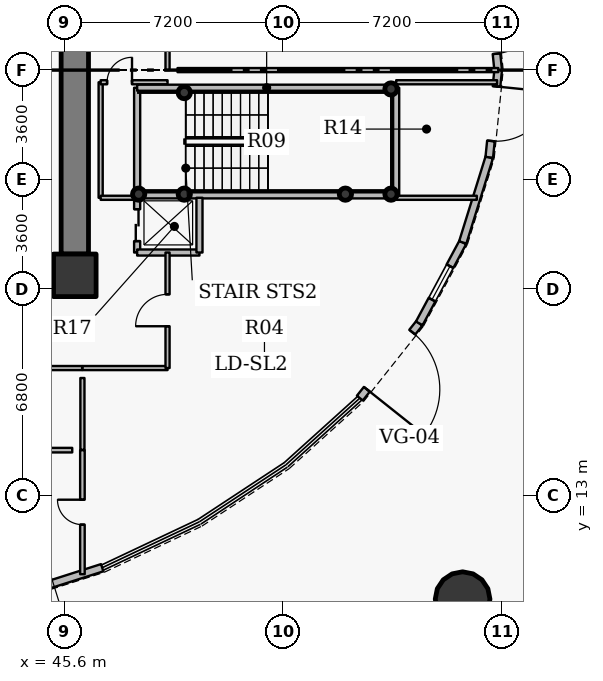
"""IFC4 building model, lengths in metres.
Left out: names, types, materials, properties, quantities, classifications, styles, units other than length and angle.
Written with IfcOpenShell. Run it as: python <this file> out.ifc"""

import sys

from ifc_helpers import new_model, si_unit, direction, frame, frame_2d, origin, origin_2d, place, context, subcontext, project, spatial, rectangle, hollow_circle, extrude, source, transform, mapped, element, fill, save


model = new_model("IFC4")
c1 = context("Model", 3, precision=1e-05, world=origin(), true_north=direction((0.0, 1.0)))
c2 = subcontext(c1, "Body", "Model", "MODEL_VIEW")
j1 = project(units=[si_unit("LENGTHUNIT", "METRE"), si_unit("PLANEANGLEUNIT", "RADIAN")], contexts=[c1])
p1 = place(None, origin())
s1 = spatial("IfcSite", under=j1, at=p1, CompositionType="ELEMENT")
p2 = place(p1, origin())
s2 = spatial("IfcBuilding", under=s1, at=p2, CompositionType="ELEMENT")
p3 = place(p2, origin())
s3 = spatial("IfcBuildingStorey", under=s2, at=p3, CompositionType="ELEMENT", Elevation=0.0)
p4 = place(p3, frame((45.95, 20.25, 0.0), z_axis=(0.0, 0.0, 1.0), x_axis=(1.0, 0.0, 0.0)))
e1 = element("IfcColumn", 1, at=p4, inside=s3, PredefinedType="COLUMN", context=c2, shape_type="SweptSolid", body=[
    extrude(rectangle(XDim=1.4, YDim=1.4, at=origin_2d()), origin(), (0.0, 0.0, 1.0), 6.0),
])
for number, where, z_axis, x_axis in (
    (2, (56.35, 26.38, 0.0), (0.0, 0.0, 1.0), (1.0, 0.0, 0.0)),
    (3, (56.35, 22.92, 0.0), (0.0, 0.0, 1.0), (1.0, 0.0, 0.0)),
    (4, (54.85, 22.92, 0.0), (0.0, 0.0, 1.0), (1.0, 0.0, 0.0)),
    (5, (49.55, 26.26, 0.0), (0.0, 0.0, 1.0), (1.0, 0.0, 0.0)),
    (6, (49.55, 22.92, 0.0), (0.0, 0.0, 1.0), (1.0, 0.0, 0.0)),
    (7, (48.05, 22.92, 0.0), (0.0, 0.0, 1.0), (1.0, 0.0, 0.0)),
):
    element("IfcColumn", number, at=place(p3, frame(where, z_axis=z_axis, x_axis=x_axis)), inside=s3, PredefinedType="COLUMN", context=c2, shape_type="SweptSolid", body=[
        extrude(hollow_circle(Radius=0.203, WallThickness=0.016, at=origin_2d()), origin(), (0.0, 0.0, 1.0), 6.0),
    ])
p5 = place(p3, frame((45.95, 33.05, 0.0), z_axis=(0.0, 0.0, 1.0), x_axis=(0.0, -1.0, 0.0)))
e8 = element("IfcWall", 8, at=p5, inside=s3, PredefinedType="SHEAR", context=c2, shape_type="SweptSolid", body=[
    extrude(rectangle(XDim=12.1, YDim=0.9, at=frame_2d((6.05, 0.0))), origin(), (0.0, 0.0, 1.0), 5.15),
])
p6 = place(p5, frame((2.328, 0.0, 0.0)))
e9 = element("IfcOpeningElement", 9, at=p6, cuts=e8, PredefinedType="OPENING", context=c2, shape_type="SweptSolid", body=[
    extrude(rectangle(XDim=1.15, YDim=2.15, at=origin_2d()), frame((0.575, 0.46, 1.075), z_axis=(0.0, -1.0, 0.0), x_axis=(1.0, 0.0, 0.0)), (0.0, 0.0, 1.0), 0.92),
])
p7 = place(p3, frame((45.25, 20.25, 0.0), z_axis=(0.0, 0.0, 1.0), x_axis=(-1.0, 0.0, 0.0)))
e10 = element("IfcWall", 10, at=p7, inside=s3, PredefinedType="SHEAR", context=c2, shape_type="SweptSolid", body=[
    extrude(rectangle(XDim=18.5, YDim=0.9, at=frame_2d((9.25, 0.0))), origin(), (0.0, 0.0, 1.0), 5.15),
])
p8 = place(p7, frame((10.0, 0.0, 0.0)))
e11 = element("IfcOpeningElement", 11, at=p8, cuts=e10, PredefinedType="OPENING", context=c2, shape_type="SweptSolid", body=[
    extrude(rectangle(XDim=1.15, YDim=2.15, at=origin_2d()), frame((0.575, 0.46, 1.075), z_axis=(0.0, -1.0, 0.0), x_axis=(1.0, 0.0, 0.0)), (0.0, 0.0, 1.0), 0.92),
])
p9 = place(p3, frame((58.705, 9.599, 0.0), z_axis=(0.0, 0.0, 1.0), x_axis=(1.0, 0.0, 0.0)))
e12 = element("IfcColumn", 12, at=p9, inside=s3, PredefinedType="COLUMN", context=c2, shape_type="SweptSolid", body=[
    extrude(hollow_circle(Radius=0.9, WallThickness=0.05, at=origin_2d()), origin(), (0.0, 0.0, 1.0), 6.0),
])
p10 = place(p3, frame((59.582, 29.869, 0.0), z_axis=(0.0, 0.0, 1.0), x_axis=(0.10159063445, -0.994826287847, 0.0)))
e13 = element("IfcWall", 13, at=p10, inside=s3, PredefinedType="SOLIDWALL", context=c2, shape_type="SweptSolid", body=[
    extrude(rectangle(XDim=2.884, YDim=0.25, at=frame_2d((1.442, 0.0))), origin(), (0.0, 0.0, 1.0), 4.885),
])
p11 = place(p10, frame((0.542, 0.0, 0.0)))
e14 = element("IfcOpeningElement", 14, at=p11, cuts=e13, PredefinedType="OPENING", context=c2, shape_type="SweptSolid", body=[
    extrude(rectangle(XDim=1.8, YDim=2.2, at=origin_2d()), frame((0.9, 0.135, 1.1), z_axis=(0.0, -1.0, 0.0), x_axis=(1.0, 0.0, 0.0)), (0.0, 0.0, 1.0), 0.27),
])
p12 = place(p3, frame((46.85, 10.633, 0.0), z_axis=(0.0, 0.0, 1.0), x_axis=(-0.952608721119, -0.304198330777, 0.0)))
e15 = element("IfcWall", 15, at=p12, inside=s3, PredefinedType="SOLIDWALL", context=c2, shape_type="SweptSolid", body=[
    extrude(rectangle(XDim=3.636, YDim=0.25, at=frame_2d((1.818, 0.0))), origin(), (0.0, 0.0, 1.0), 4.885),
])
p13 = place(p3, frame((57.28, 18.67, 0.0), z_axis=(0.0, 0.0, 1.0), x_axis=(-0.622274661909, -0.782798981314, 0.0)))
e16 = element("IfcWall", 16, at=p13, inside=s3, PredefinedType="SOLIDWALL", context=c2, shape_type="SweptSolid", body=[
    extrude(rectangle(XDim=3.141, YDim=0.25, at=frame_2d((1.57, 0.0))), origin(), (0.0, 0.0, 1.0), 4.885),
])
p14 = place(p13, frame((0.37, 0.0, 0.0)))
e17 = element("IfcOpeningElement", 17, at=p14, cuts=e16, PredefinedType="OPENING", context=c2, shape_type="SweptSolid", body=[
    extrude(rectangle(XDim=2.4, YDim=2.2, at=origin_2d()), frame((1.2, 0.135, 1.1), z_axis=(0.0, -1.0, 0.0), x_axis=(1.0, 0.0, 0.0)), (0.0, 0.0, 1.0), 0.27),
])
p15 = place(p3, frame((58.71, 21.332, 0.0), z_axis=(0.0, 0.0, 1.0), x_axis=(-0.473391396038, -0.880852193139, 0.0)))
e18 = element("IfcWall", 18, at=p15, inside=s3, PredefinedType="SOLIDWALL", context=c2, shape_type="SweptSolid", body=[
    extrude(rectangle(XDim=3.022, YDim=0.25, at=frame_2d((1.511, 0.0))), origin(), (0.0, 0.0, 1.0), 4.885),
])
p16 = place(p15, frame((0.886, 0.0, 0.9)))
e19 = element("IfcOpeningElement", 19, at=p16, cuts=e18, PredefinedType="OPENING", context=c2, shape_type="SweptSolid", body=[
    extrude(rectangle(XDim=1.25, YDim=1.65, at=origin_2d()), frame((0.625, 0.135, 0.825), z_axis=(0.0, -1.0, 0.0), x_axis=(1.0, 0.0, 0.0)), (0.0, 0.0, 1.0), 0.27),
])
p17 = place(p3, frame((59.582, 24.131, 0.0), z_axis=(0.0, 0.0, 1.0), x_axis=(-0.297355038878, -0.954766977254, 0.0)))
e20 = element("IfcWall", 20, at=p17, inside=s3, PredefinedType="SOLIDWALL", context=c2, shape_type="SweptSolid", body=[
    extrude(rectangle(XDim=2.932, YDim=0.25, at=frame_2d((1.466, 0.0))), origin(), (0.0, 0.0, 1.0), 5.7),
])
p18 = place(p3, frame((59.875, 27.0, 0.0), z_axis=(0.0, 0.0, 1.0), x_axis=(-0.10159063445, -0.994826287847, 0.0)))
e21 = element("IfcWall", 21, at=p18, inside=s3, PredefinedType="SOLIDWALL", context=c2, shape_type="SweptSolid", body=[
    extrude(rectangle(XDim=2.884, YDim=0.25, at=frame_2d((1.442, 0.0))), origin(), (0.0, 0.0, 1.0), 4.885),
])
p19 = place(p18, frame((0.542, 0.0, 0.0)))
e22 = element("IfcOpeningElement", 22, at=p19, cuts=e21, PredefinedType="OPENING", context=c2, shape_type="SweptSolid", body=[
    extrude(rectangle(XDim=1.8, YDim=2.2, at=origin_2d()), frame((0.9, 0.135, 1.1), z_axis=(0.0, -1.0, 0.0), x_axis=(1.0, 0.0, 0.0)), (0.0, 0.0, 1.0), 0.27),
])
p20 = place(p3, frame((46.2, 10.42, 0.0), z_axis=(0.0, 0.0, 1.0), x_axis=(0.0, 1.0, 0.0)))
e23 = element("IfcWall", 23, at=p20, inside=s3, PredefinedType="PARTITIONING", context=c2, shape_type="SweptSolid", body=[
    extrude(rectangle(XDim=4.08, YDim=0.15, at=frame_2d((2.04, 0.0))), origin(), (0.0, 0.0, 1.0), 5.7),
])
p21 = place(p20, frame((1.63, 0.0, 0.0)))
e24 = element("IfcOpeningElement", 24, at=p21, cuts=e23, PredefinedType="OPENING", context=c2, shape_type="SweptSolid", body=[
    extrude(rectangle(XDim=0.82, YDim=2.1, at=origin_2d()), frame((0.41, 0.085, 1.05), z_axis=(0.0, -1.0, 0.0), x_axis=(1.0, 0.0, 0.0)), (0.0, 0.0, 1.0), 0.17),
])
p22 = place(p3, frame((46.2, 17.2, 0.0), z_axis=(0.0, 0.0, 1.0), x_axis=(1.0, 0.0, 0.0)))
e25 = element("IfcWall", 25, at=p22, inside=s3, PredefinedType="PARTITIONING", context=c2, shape_type="SweptSolid", body=[
    extrude(rectangle(XDim=2.8, YDim=0.135, at=frame_2d((1.4, 0.0))), origin(), (0.0, 0.0, 1.0), 4.885),
])
p23 = place(p3, frame((46.8, 22.8, 0.0), z_axis=(0.0, 0.0, 1.0), x_axis=(0.0, 1.0, 0.0)))
e26 = element("IfcWall", 26, at=p23, inside=s3, PredefinedType="PARTITIONING", context=c2, shape_type="SweptSolid", body=[
    extrude(rectangle(XDim=3.8, YDim=0.135, at=frame_2d((1.9, 0.0))), origin(), (0.0, 0.0, 1.0), 4.885),
])
p24 = place(p3, frame((46.8, 22.8, 0.0), z_axis=(0.0, 0.0, 1.0), x_axis=(1.0, 0.0, 0.0)))
e27 = element("IfcWall", 27, at=p24, inside=s3, PredefinedType="PARTITIONING", context=c2, shape_type="SweptSolid", body=[
    extrude(rectangle(XDim=1.2, YDim=0.135, at=frame_2d((0.6, 0.0))), origin(), (0.0, 0.0, 1.0), 4.885),
])
p25 = place(p3, frame((46.8, 26.6, 0.0), z_axis=(0.0, 0.0, 1.0), x_axis=(1.0, 0.0, 0.0)))
e28 = element("IfcWall", 28, at=p25, inside=s3, PredefinedType="PARTITIONING", context=c2, shape_type="SweptSolid", body=[
    extrude(rectangle(XDim=2.2, YDim=0.135, at=frame_2d((1.1, 0.0))), origin(), (0.0, 0.0, 1.0), 5.7),
])
p26 = place(p25, frame((0.211, 0.0, 0.0)))
e29 = element("IfcOpeningElement", 29, at=p26, cuts=e28, PredefinedType="OPENING", context=c2, shape_type="SweptSolid", body=[
    extrude(rectangle(XDim=0.82, YDim=2.1, at=origin_2d()), frame((0.41, 0.078, 1.05), z_axis=(0.0, -1.0, 0.0), x_axis=(1.0, 0.0, 0.0)), (0.0, 0.0, 1.0), 0.155),
])
p27 = place(p3, frame((48.0, 21.0, 0.0), z_axis=(0.0, 0.0, 1.0), x_axis=(0.0, 1.0, 0.0)))
e30 = element("IfcWall", 30, at=p27, inside=s3, PredefinedType="PARTITIONING", context=c2, shape_type="SweptSolid", body=[
    extrude(rectangle(XDim=1.8, YDim=0.2, at=frame_2d((0.9, 0.0))), origin(), (0.0, 0.0, 1.0), 4.885),
])
p28 = place(p27, frame((0.375, 0.0, 0.0)))
e31 = element("IfcOpeningElement", 31, at=p28, cuts=e30, PredefinedType="OPENING", context=c2, shape_type="SweptSolid", body=[
    extrude(rectangle(XDim=1.05, YDim=2.15, at=origin_2d()), frame((0.525, 0.11, 1.075), z_axis=(0.0, -1.0, 0.0), x_axis=(1.0, 0.0, 0.0)), (0.0, 0.0, 1.0), 0.22),
])
p29 = place(p3, frame((48.0, 21.0, 0.0), z_axis=(0.0, 0.0, 1.0), x_axis=(1.0, 0.0, 0.0)))
e32 = element("IfcWall", 32, at=p29, inside=s3, PredefinedType="PARTITIONING", context=c2, shape_type="SweptSolid", body=[
    extrude(rectangle(XDim=2.05, YDim=0.2, at=frame_2d((1.025, 0.0))), origin(), (0.0, 0.0, 1.0), 5.7),
])
p30 = place(p3, frame((48.0, 22.88, 0.0), z_axis=(0.0, 0.0, 1.0), x_axis=(0.0, 1.0, 0.0)))
e33 = element("IfcWall", 33, at=p30, inside=s3, PredefinedType="PARTITIONING", context=c2, shape_type="SweptSolid", body=[
    extrude(rectangle(XDim=3.54, YDim=0.2, at=frame_2d((1.77, 0.0))), origin(), (0.0, 0.0, 1.0), 5.7),
])
p31 = place(p3, frame((48.01, 22.88, 0.0), z_axis=(0.0, 0.0, 1.0), x_axis=(1.0, 0.0, 0.0)))
e34 = element("IfcWall", 34, at=p31, inside=s3, PredefinedType="PARTITIONING", context=c2, shape_type="SweptSolid", body=[
    extrude(rectangle(XDim=8.51, YDim=0.2, at=frame_2d((4.255, 0.0))), origin(), (0.0, 0.0, 1.0), 5.7),
])
p32 = place(p3, frame((48.0, 26.42, 0.0), z_axis=(0.0, 0.0, 1.0), x_axis=(1.0, 0.0, 0.0)))
e35 = element("IfcWall", 35, at=p32, inside=s3, PredefinedType="PARTITIONING", context=c2, shape_type="SweptSolid", body=[
    extrude(rectangle(XDim=8.52, YDim=0.2, at=frame_2d((4.26, 0.0))), origin(), (0.0, 0.0, 1.0), 5.7),
])
p33 = place(p3, frame((49.0, 17.2, 0.0), z_axis=(0.0, 0.0, 1.0), x_axis=(0.0, 1.0, 0.0)))
e36 = element("IfcWall", 36, at=p33, inside=s3, PredefinedType="PARTITIONING", context=c2, shape_type="SweptSolid", body=[
    extrude(rectangle(XDim=3.8, YDim=0.135, at=frame_2d((1.9, 0.0))), origin(), (0.0, 0.0, 1.0), 4.885),
])
p34 = place(p33, frame((1.375, 0.0, 0.0)))
e37 = element("IfcOpeningElement", 37, at=p34, cuts=e36, PredefinedType="OPENING", context=c2, shape_type="SweptSolid", body=[
    extrude(rectangle(XDim=1.05, YDim=2.15, at=origin_2d()), frame((0.525, 0.078, 1.075), z_axis=(0.0, -1.0, 0.0), x_axis=(1.0, 0.0, 0.0)), (0.0, 0.0, 1.0), 0.155),
])
p35 = place(p3, frame((49.0, 27.0, 0.0), z_axis=(0.0, 0.0, 1.0), x_axis=(0.0, 1.0, 0.0)))
e38 = element("IfcWall", 38, at=p35, inside=s3, PredefinedType="PARTITIONING", context=c2, shape_type="SweptSolid", body=[
    extrude(rectangle(XDim=9.8, YDim=0.135, at=frame_2d((4.9, 0.0))), origin(), (0.0, 0.0, 1.0), 4.885),
])
p36 = place(p35, frame((4.375, 0.0, 0.0)))
e39 = element("IfcOpeningElement", 39, at=p36, cuts=e38, PredefinedType="OPENING", context=c2, shape_type="SweptSolid", body=[
    extrude(rectangle(XDim=1.05, YDim=2.15, at=origin_2d()), frame((0.525, 0.078, 1.075), z_axis=(0.0, -1.0, 0.0), x_axis=(1.0, 0.0, 0.0)), (0.0, 0.0, 1.0), 0.155),
])
p37 = place(p3, frame((50.05, 21.0, 0.0), z_axis=(0.0, 0.0, 1.0), x_axis=(0.0, 1.0, 0.0)))
e40 = element("IfcWall", 40, at=p37, inside=s3, PredefinedType="PARTITIONING", context=c2, shape_type="SweptSolid", body=[
    extrude(rectangle(XDim=1.8, YDim=0.2, at=frame_2d((0.9, 0.0))), origin(), (0.0, 0.0, 1.0), 4.885),
])
p38 = place(p3, frame((56.53, 22.8, 0.0), z_axis=(0.0, 0.0, 1.0), x_axis=(1.0, 0.0, 0.0)))
e41 = element("IfcWall", 41, at=p38, inside=s3, PredefinedType="PARTITIONING", context=c2, shape_type="SweptSolid", body=[
    extrude(rectangle(XDim=2.643, YDim=0.135, at=frame_2d((1.321, 0.0))), origin(), (0.0, 0.0, 1.0), 5.7),
])
p39 = place(p3, frame((56.52, 22.88, 0.0), z_axis=(0.0, 0.0, 1.0), x_axis=(0.0, 1.0, 0.0)))
e42 = element("IfcWall", 42, at=p39, inside=s3, PredefinedType="PARTITIONING", context=c2, shape_type="SweptSolid", body=[
    extrude(rectangle(XDim=3.54, YDim=0.2, at=frame_2d((1.77, 0.0))), origin(), (0.0, 0.0, 1.0), 5.7),
])
p40 = place(p3, frame((56.52, 26.6, 0.0), z_axis=(0.0, 0.0, 1.0), x_axis=(1.0, 0.0, 0.0)))
e43 = element("IfcWall", 43, at=p40, inside=s3, PredefinedType="PARTITIONING", context=c2, shape_type="SweptSolid", body=[
    extrude(rectangle(XDim=3.319, YDim=0.135, at=frame_2d((1.66, 0.0))), origin(), (0.0, 0.0, 1.0), 5.7),
])
p41 = place(p3, frame((46.19, 17.2, 0.0), z_axis=(0.0, 0.0, 1.0), x_axis=(-1.0, 0.0, 0.0)))
e44 = element("IfcWall", 44, at=p41, inside=s3, PredefinedType="PARTITIONING", context=c2, shape_type="SweptSolid", body=[
    extrude(rectangle(XDim=1.662, YDim=0.135, at=frame_2d((0.831, 0.0))), origin(), (0.0, 0.0, 1.0), 5.7),
])
p42 = place(p3, frame((45.26, 19.8, 0.0), z_axis=(0.0, 0.0, 1.0), x_axis=(1.0, 0.0, 0.0)))
e45 = element("IfcWall", 45, at=p42, inside=s3, PredefinedType="PARTITIONING", context=c2, shape_type="SweptSolid", body=[
    extrude(rectangle(XDim=1.14, YDim=0.135, at=frame_2d((0.57, 0.0))), origin(), (0.0, 0.0, 1.0), 4.885),
])
p43 = place(p3, frame((46.4, 20.107, 0.0), z_axis=(0.0, 0.0, 1.0), x_axis=(0.0, 1.0, 0.0)))
e46 = element("IfcWall", 46, at=p43, inside=s3, PredefinedType="PARTITIONING", context=c2, shape_type="SweptSolid", body=[
    extrude(rectangle(XDim=0.833, YDim=0.135, at=frame_2d((0.416, 0.0))), origin(), (0.0, 0.0, 1.0), 5.7),
])
p44 = place(p3, frame((59.88, 27.0, 0.0), z_axis=(0.0, 0.0, 1.0), x_axis=(-1.0, 0.0, 0.0)))
e47 = element("IfcWall", 47, at=p44, inside=s3, PredefinedType="PARTITIONING", context=c2, shape_type="SweptSolid", body=[
    extrude(rectangle(XDim=10.552, YDim=0.135, at=frame_2d((5.276, 0.0))), origin(), (0.0, 0.0, 1.0), 4.885),
])
p45 = place(p3, frame((44.528, 14.5, 0.0), z_axis=(0.0, 0.0, 1.0), x_axis=(1.0, 0.0, 0.0)))
e48 = element("IfcWall", 48, at=p45, inside=s3, PredefinedType="PARTITIONING", context=c2, shape_type="SweptSolid", body=[
    extrude(rectangle(XDim=1.337, YDim=0.15, at=frame_2d((0.669, 0.0))), origin(), (0.0, 0.0, 1.0), 5.7),
])
p46 = place(p3, frame((46.2, 14.51, 0.0), z_axis=(0.0, 0.0, 1.0), x_axis=(0.0, 1.0, 0.0)))
e49 = element("IfcWall", 49, at=p46, inside=s3, PredefinedType="PARTITIONING", context=c2, shape_type="SweptSolid", body=[
    extrude(rectangle(XDim=2.363, YDim=0.135, at=frame_2d((1.181, 0.0))), origin(), (0.0, 0.0, 1.0), 5.7),
])
m1 = source(origin(), c2, "Body", "SweptSolid", [
    extrude(rectangle(XDim=1.8, YDim=2.2, at=origin_2d()), frame((0.9, 0.025, 1.1), z_axis=(0.0, -1.0, 0.0), x_axis=(1.0, 0.0, 0.0)), (0.0, 0.0, 1.0), 0.05),
])
p47 = place(p11, origin())
e50 = element("IfcDoor", 50, at=p47, inside=s3, OperationType="SINGLE_SWING_LEFT", PredefinedType="DOOR", context=c2, shape_type="MappedRepresentation", body=[
    mapped(m1, transform((0.0, 0.0, 0.0), x_axis=(1.0, 0.0, 0.0), y_axis=(0.0, 1.0, 0.0), z_axis=(0.0, 0.0, 1.0), scale=1.0)),
])
fill(e14, e50)
m2 = source(origin(), c2, "Body", "SweptSolid", [
    extrude(rectangle(XDim=2.4, YDim=2.2, at=origin_2d()), frame((1.2, 0.025, 1.1), z_axis=(0.0, -1.0, 0.0), x_axis=(1.0, 0.0, 0.0)), (0.0, 0.0, 1.0), 0.05),
])
p48 = place(p14, origin())
e51 = element("IfcDoor", 51, at=p48, inside=s3, OperationType="SINGLE_SWING_RIGHT", PredefinedType="GATE", context=c2, shape_type="MappedRepresentation", body=[
    mapped(m2, transform((0.0, 0.0, 0.0), x_axis=(1.0, 0.0, 0.0), y_axis=(0.0, 1.0, 0.0), z_axis=(0.0, 0.0, 1.0), scale=1.0)),
])
fill(e17, e51)
m3 = source(origin(), c2, "Body", "SweptSolid", [
    extrude(rectangle(XDim=1.25, YDim=1.65, at=origin_2d()), frame((0.625, 0.03, 0.825), z_axis=(0.0, -1.0, 0.0), x_axis=(1.0, 0.0, 0.0)), (0.0, 0.0, 1.0), 0.06),
])
p49 = place(p16, origin())
e52 = element("IfcWindow", 52, at=p49, inside=s3, PartitioningType="SINGLE_PANEL", PredefinedType="WINDOW", context=c2, shape_type="MappedRepresentation", body=[
    mapped(m3, transform((0.0, 0.0, 0.0), x_axis=(1.0, 0.0, 0.0), y_axis=(0.0, 1.0, 0.0), z_axis=(0.0, 0.0, 1.0), scale=1.0)),
])
fill(e19, e52)
p50 = place(p19, origin())
e53 = element("IfcDoor", 53, at=p50, inside=s3, OperationType="SINGLE_SWING_LEFT", PredefinedType="DOOR", context=c2, shape_type="MappedRepresentation", body=[
    mapped(m1, transform((0.0, 0.0, 0.0), x_axis=(1.0, 0.0, 0.0), y_axis=(0.0, 1.0, 0.0), z_axis=(0.0, 0.0, 1.0), scale=1.0)),
])
fill(e22, e53)
m4 = source(origin(), c2, "Body", "SweptSolid", [
    extrude(rectangle(XDim=1.05, YDim=2.15, at=origin_2d()), frame((0.525, 0.025, 1.075), z_axis=(0.0, -1.0, 0.0), x_axis=(1.0, 0.0, 0.0)), (0.0, 0.0, 1.0), 0.05),
])
p51 = place(p28, origin())
e54 = element("IfcDoor", 54, at=p51, inside=s3, OperationType="DOUBLE_DOOR_SLIDING", PredefinedType="USERDEFINED", context=c2, shape_type="MappedRepresentation", body=[
    mapped(m4, transform((0.0, 0.0, 0.0), x_axis=(1.0, 0.0, 0.0), y_axis=(0.0, 1.0, 0.0), z_axis=(0.0, 0.0, 1.0), scale=1.0)),
])
fill(e31, e54)
m5 = source(origin(), c2, "Body", "SweptSolid", [
    extrude(rectangle(XDim=0.82, YDim=2.1, at=origin_2d()), frame((0.41, 0.025, 1.05), z_axis=(0.0, -1.0, 0.0), x_axis=(1.0, 0.0, 0.0)), (0.0, 0.0, 1.0), 0.05),
])
p52 = place(p26, origin())
e55 = element("IfcDoor", 55, at=p52, inside=s3, OperationType="SINGLE_SWING_RIGHT", PredefinedType="DOOR", context=c2, shape_type="MappedRepresentation", body=[
    mapped(m5, transform((0.0, 0.0, 0.0), x_axis=(1.0, 0.0, 0.0), y_axis=(0.0, 1.0, 0.0), z_axis=(0.0, 0.0, 1.0), scale=1.0)),
])
fill(e29, e55)
m6 = source(origin(), c2, "Body", "SweptSolid", [
    extrude(rectangle(XDim=1.05, YDim=2.15, at=origin_2d()), frame((0.525, 0.025, 1.075), z_axis=(0.0, -1.0, 0.0), x_axis=(1.0, 0.0, 0.0)), (0.0, 0.0, 1.0), 0.05),
])
p53 = place(p34, origin())
e56 = element("IfcDoor", 56, at=p53, inside=s3, OperationType="SINGLE_SWING_LEFT", PredefinedType="DOOR", context=c2, shape_type="MappedRepresentation", body=[
    mapped(m6, transform((0.0, 0.0, 0.0), x_axis=(1.0, 0.0, 0.0), y_axis=(0.0, 1.0, 0.0), z_axis=(0.0, 0.0, 1.0), scale=1.0)),
])
fill(e37, e56)
p54 = place(p21, origin())
e57 = element("IfcDoor", 57, at=p54, inside=s3, OperationType="SINGLE_SWING_RIGHT", PredefinedType="DOOR", context=c2, shape_type="MappedRepresentation", body=[
    mapped(m5, transform((0.0, 0.0, 0.0), x_axis=(1.0, 0.0, 0.0), y_axis=(0.0, 1.0, 0.0), z_axis=(0.0, 0.0, 1.0), scale=1.0)),
])
fill(e24, e57)
save(model, sys.argv[1])
